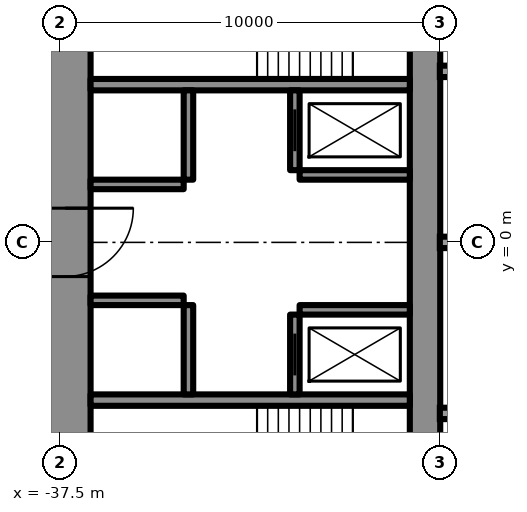
"""IFC4 building model, lengths in metres.
Left out: names, types, materials, properties, quantities, classifications, styles, units other than length and angle.
Written with IfcOpenShell. Run it as: python <this file> out.ifc"""

import sys

from ifc_helpers import new_model, si_unit, direction, frame, frame_2d, origin, place, context, subcontext, project, spatial, rectangle, extrude, element, fill, save


model = new_model("IFC4")
c1 = context("Model", 3, precision=1e-05, world=origin(), true_north=direction((0.0, 1.0)))
c2 = subcontext(c1, "Body", "Model", "MODEL_VIEW")
j1 = project(units=[si_unit("LENGTHUNIT", "METRE"), si_unit("PLANEANGLEUNIT", "RADIAN")], contexts=[c1])
p1 = place(None, origin())
s1 = spatial("IfcSite", under=j1, at=p1, CompositionType="ELEMENT")
p2 = place(p1, origin())
s2 = spatial("IfcBuilding", under=s1, at=p2, CompositionType="ELEMENT")
p3 = place(p2, frame((0.0, 0.0, 87.0)))
s3 = spatial("IfcBuildingStorey", under=s2, at=p3, CompositionType="ELEMENT", Elevation=87.0)
p4 = place(p3, frame((-27.9, 8.6, 0.0), z_axis=(0.0, 0.0, 1.0), x_axis=(0.0, -1.0, 0.0)))
e1 = element("IfcWall", 1, at=p4, inside=s3, PredefinedType="SHEAR", context=c2, shape_type="SweptSolid", body=[
    extrude(rectangle(XDim=17.2, YDim=0.8, at=frame_2d((8.6, 0.0))), origin(), (0.0, 0.0, 1.0), 3.6),
])
p5 = place(p4, frame((2.45, 0.0, 0.6)))
e2 = element("IfcOpeningElement", 2, at=p5, cuts=e1, PredefinedType="OPENING", context=c2, shape_type="SweptSolid", body=[
    extrude(rectangle(XDim=0.6, YDim=2.1, at=frame_2d((0.3, 1.05))), frame((0.0, 0.41, 0.0), z_axis=(0.0, -1.0, 0.0), x_axis=(1.0, 0.0, 0.0)), (0.0, 0.0, 1.0), 0.82),
])
p6 = place(p4, frame((14.15, 0.0, 0.6)))
e3 = element("IfcOpeningElement", 3, at=p6, cuts=e1, PredefinedType="OPENING", context=c2, shape_type="SweptSolid", body=[
    extrude(rectangle(XDim=0.6, YDim=2.1, at=frame_2d((0.3, 1.05))), frame((0.0, 0.41, 0.0), z_axis=(0.0, -1.0, 0.0), x_axis=(1.0, 0.0, 0.0)), (0.0, 0.0, 1.0), 0.82),
])
p7 = place(p3, frame((-37.375, 8.6, 0.0), z_axis=(0.0, 0.0, 1.0), x_axis=(0.0, -1.0, 0.0)))
e4 = element("IfcWall", 4, at=p7, inside=s3, PredefinedType="SHEAR", context=c2, shape_type="SweptSolid", body=[
    extrude(rectangle(XDim=17.2, YDim=1.35, at=frame_2d((8.6, 0.0))), origin(), (0.0, 0.0, 1.0), 3.6),
])
p8 = place(p7, frame((7.7, 0.0, 0.0)))
e5 = element("IfcOpeningElement", 5, at=p8, cuts=e4, PredefinedType="OPENING", context=c2, shape_type="SweptSolid", body=[
    extrude(rectangle(XDim=1.8, YDim=2.2, at=frame_2d((0.9, 1.1))), frame((0.0, 0.685, 0.0), z_axis=(0.0, -1.0, 0.0), x_axis=(1.0, 0.0, 0.0)), (0.0, 0.0, 1.0), 1.37),
])
for number, where, z_axis, x_axis in (
    (6, (-28.3, 4.15, 0.0), (0.0, 0.0, 1.0), (-1.0, 0.0, 0.0)),
    (7, (-28.3, -4.15, 0.0), (0.0, 0.0, 1.0), (-1.0, 0.0, 0.0)),
):
    element("IfcWall", number, at=place(p3, frame(where, z_axis=z_axis, x_axis=x_axis)), inside=s3, PredefinedType="SHEAR", context=c2, shape_type="SweptSolid", body=[
        extrude(rectangle(XDim=8.4, YDim=0.3, at=frame_2d((4.2, 0.0))), origin(), (0.0, 0.0, 1.0), 3.6),
    ])
p9 = place(p3, frame((-31.325, 4.0, 0.0), z_axis=(0.0, 0.0, 1.0), x_axis=(0.0, -1.0, 0.0)))
e8 = element("IfcWall", 8, at=p9, inside=s3, PredefinedType="SHEAR", context=c2, shape_type="SweptSolid", body=[
    extrude(rectangle(XDim=2.1, YDim=0.25, at=frame_2d((1.05, 0.0))), origin(), (0.0, 0.0, 1.0), 3.6),
])
p10 = place(p9, frame((0.5, 0.0, 0.0)))
e9 = element("IfcOpeningElement", 9, at=p10, cuts=e8, PredefinedType="OPENING", context=c2, shape_type="SweptSolid", body=[
    extrude(rectangle(XDim=1.1, YDim=2.2, at=frame_2d((0.55, 1.1))), frame((0.0, 0.135, 0.0), z_axis=(0.0, -1.0, 0.0), x_axis=(1.0, 0.0, 0.0)), (0.0, 0.0, 1.0), 0.27),
])
p11 = place(p3, frame((-34.125, 4.0, 0.0), z_axis=(0.0, 0.0, 1.0), x_axis=(0.0, -1.0, 0.0)))
e10 = element("IfcWall", 10, at=p11, inside=s3, PredefinedType="SHEAR", context=c2, shape_type="SweptSolid", body=[
    extrude(rectangle(XDim=2.35, YDim=0.25, at=frame_2d((1.175, 0.0))), origin(), (0.0, 0.0, 1.0), 3.6),
])
p12 = place(p3, frame((-28.3, 1.775, 0.0), z_axis=(0.0, 0.0, 1.0), x_axis=(-1.0, 0.0, 0.0)))
e11 = element("IfcWall", 11, at=p12, inside=s3, PredefinedType="SHEAR", context=c2, shape_type="SweptSolid", body=[
    extrude(rectangle(XDim=2.9, YDim=0.25, at=frame_2d((1.45, 0.0))), origin(), (0.0, 0.0, 1.0), 3.6),
])
p13 = place(p3, frame((-34.25, 1.525, 0.0), z_axis=(0.0, 0.0, 1.0), x_axis=(-1.0, 0.0, 0.0)))
e12 = element("IfcWall", 12, at=p13, inside=s3, PredefinedType="SHEAR", context=c2, shape_type="SweptSolid", body=[
    extrude(rectangle(XDim=2.45, YDim=0.25, at=frame_2d((1.225, 0.0))), origin(), (0.0, 0.0, 1.0), 3.6),
])
p14 = place(p3, frame((-31.325, -1.9, 0.0), z_axis=(0.0, 0.0, 1.0), x_axis=(0.0, -1.0, 0.0)))
e13 = element("IfcWall", 13, at=p14, inside=s3, PredefinedType="SHEAR", context=c2, shape_type="SweptSolid", body=[
    extrude(rectangle(XDim=2.1, YDim=0.25, at=frame_2d((1.05, 0.0))), origin(), (0.0, 0.0, 1.0), 3.6),
])
p15 = place(p14, frame((0.5, 0.0, 0.0)))
e14 = element("IfcOpeningElement", 14, at=p15, cuts=e13, PredefinedType="OPENING", context=c2, shape_type="SweptSolid", body=[
    extrude(rectangle(XDim=1.1, YDim=2.2, at=frame_2d((0.55, 1.1))), frame((0.0, 0.135, 0.0), z_axis=(0.0, -1.0, 0.0), x_axis=(1.0, 0.0, 0.0)), (0.0, 0.0, 1.0), 0.27),
])
p16 = place(p3, frame((-34.125, -1.65, 0.0), z_axis=(0.0, 0.0, 1.0), x_axis=(0.0, -1.0, 0.0)))
e15 = element("IfcWall", 15, at=p16, inside=s3, PredefinedType="SHEAR", context=c2, shape_type="SweptSolid", body=[
    extrude(rectangle(XDim=2.35, YDim=0.25, at=frame_2d((1.175, 0.0))), origin(), (0.0, 0.0, 1.0), 3.6),
])
p17 = place(p3, frame((-28.3, -1.775, 0.0), z_axis=(0.0, 0.0, 1.0), x_axis=(-1.0, 0.0, 0.0)))
e16 = element("IfcWall", 16, at=p17, inside=s3, PredefinedType="SHEAR", context=c2, shape_type="SweptSolid", body=[
    extrude(rectangle(XDim=2.9, YDim=0.25, at=frame_2d((1.45, 0.0))), origin(), (0.0, 0.0, 1.0), 3.6),
])
p18 = place(p3, frame((-34.25, -1.525, 0.0), z_axis=(0.0, 0.0, 1.0), x_axis=(-1.0, 0.0, 0.0)))
e17 = element("IfcWall", 17, at=p18, inside=s3, PredefinedType="SHEAR", context=c2, shape_type="SweptSolid", body=[
    extrude(rectangle(XDim=2.45, YDim=0.25, at=frame_2d((1.225, 0.0))), origin(), (0.0, 0.0, 1.0), 3.6),
])
p19 = place(p3, frame((-27.2, 14.3, 0.0), z_axis=(0.0, 0.0, 1.0), x_axis=(-0.866026593062, -0.499997940104, 0.0)))
e18 = element("IfcWall", 18, at=p19, inside=s3, PredefinedType="SHEAR", context=c2, shape_type="SweptSolid", body=[
    extrude(rectangle(XDim=28.946, YDim=1.2, at=frame_2d((14.473, 0.0))), origin(), (0.0, 0.0, 1.0), 3.6),
])
p20 = place(p19, frame((4.6, 0.0, 0.0)))
e19 = element("IfcOpeningElement", 19, at=p20, cuts=e18, PredefinedType="OPENING", context=c2, shape_type="SweptSolid", body=[
    extrude(rectangle(XDim=1.0, YDim=2.2, at=frame_2d((0.5, 1.1))), frame((0.0, 0.61, 0.0), z_axis=(0.0, -1.0, 0.0), x_axis=(1.0, 0.0, 0.0)), (0.0, 0.0, 1.0), 1.22),
])
p21 = place(p19, frame((13.568, 0.0, 0.0)))
e20 = element("IfcOpeningElement", 20, at=p21, cuts=e18, PredefinedType="OPENING", context=c2, shape_type="SweptSolid", body=[
    extrude(rectangle(XDim=1.8, YDim=2.03, at=frame_2d((0.9, 1.015))), frame((0.0, 0.61, 0.0), z_axis=(0.0, -1.0, 0.0), x_axis=(1.0, 0.0, 0.0)), (0.0, 0.0, 1.0), 1.22),
])
p22 = place(p3, frame((-27.2, -14.3, 0.0), z_axis=(0.0, 0.0, 1.0), x_axis=(-0.866024021859, 0.500002393557, 0.0)))
e21 = element("IfcWall", 21, at=p22, inside=s3, PredefinedType="SHEAR", context=c2, shape_type="SweptSolid", body=[
    extrude(rectangle(XDim=27.907, YDim=1.2, at=frame_2d((13.954, 0.0))), origin(), (0.0, 0.0, 1.0), 3.6),
])
p23 = place(p22, frame((4.6, 0.0, 0.0)))
e22 = element("IfcOpeningElement", 22, at=p23, cuts=e21, PredefinedType="OPENING", context=c2, shape_type="SweptSolid", body=[
    extrude(rectangle(XDim=1.0, YDim=2.2, at=frame_2d((0.5, 1.1))), frame((0.0, 0.61, 0.0), z_axis=(0.0, -1.0, 0.0), x_axis=(1.0, 0.0, 0.0)), (0.0, 0.0, 1.0), 1.22),
])
p24 = place(p22, frame((13.818, 0.0, 0.0)))
e23 = element("IfcOpeningElement", 23, at=p24, cuts=e21, PredefinedType="OPENING", context=c2, shape_type="SweptSolid", body=[
    extrude(rectangle(XDim=1.8, YDim=2.2, at=frame_2d((0.9, 1.1))), frame((0.0, 0.61, 0.0), z_axis=(0.0, -1.0, 0.0), x_axis=(1.0, 0.0, 0.0)), (0.0, 0.0, 1.0), 1.22),
])
p25 = place(p3, frame((-37.7, 10.894, 0.0), z_axis=(0.0, 0.0, 1.0), x_axis=(-0.866027905338, -0.499995667157, 0.0)))
e24 = element("IfcWall", 24, at=p25, inside=s3, PredefinedType="PARTITIONING", context=c2, shape_type="SweptSolid", body=[
    extrude(rectangle(XDim=21.787, YDim=0.2, at=frame_2d((10.894, 0.0))), origin(), (0.0, 0.0, 1.0), 3.35),
])
p26 = place(p25, frame((15.094, 0.0, 0.0)))
e25 = element("IfcOpeningElement", 25, at=p26, cuts=e24, PredefinedType="OPENING", context=c2, shape_type="SweptSolid", body=[
    extrude(rectangle(XDim=1.8, YDim=2.2, at=frame_2d((0.9, 1.1))), frame((0.0, 0.11, 0.0), z_axis=(0.0, -1.0, 0.0), x_axis=(1.0, 0.0, 0.0)), (0.0, 0.0, 1.0), 0.22),
])
p27 = place(p25, frame((4.201, 0.0, 0.0)))
e26 = element("IfcOpeningElement", 26, at=p27, cuts=e24, PredefinedType="OPENING", context=c2, shape_type="SweptSolid", body=[
    extrude(rectangle(XDim=1.8, YDim=2.2, at=frame_2d((0.9, 1.1))), frame((0.0, 0.11, 0.0), z_axis=(0.0, -1.0, 0.0), x_axis=(1.0, 0.0, 0.0)), (0.0, 0.0, 1.0), 0.22),
])
p28 = place(p3, frame((-36.92, -11.344, 0.0), z_axis=(0.0, 0.0, 1.0), x_axis=(-0.866028313256, 0.499994960614, 0.0)))
e27 = element("IfcWall", 27, at=p28, inside=s3, PredefinedType="PARTITIONING", context=c2, shape_type="SweptSolid", body=[
    extrude(rectangle(XDim=22.568, YDim=0.2, at=frame_2d((11.284, 0.0))), origin(), (0.0, 0.0, 1.0), 3.35),
])
p29 = place(p28, frame((15.994, 0.0, 0.0)))
e28 = element("IfcOpeningElement", 28, at=p29, cuts=e27, PredefinedType="OPENING", context=c2, shape_type="SweptSolid", body=[
    extrude(rectangle(XDim=1.8, YDim=2.2, at=frame_2d((0.9, 1.1))), frame((0.0, 0.11, 0.0), z_axis=(0.0, -1.0, 0.0), x_axis=(1.0, 0.0, 0.0)), (0.0, 0.0, 1.0), 0.22),
])
p30 = place(p28, frame((4.551, 0.0, 0.0)))
e29 = element("IfcOpeningElement", 29, at=p30, cuts=e27, PredefinedType="OPENING", context=c2, shape_type="SweptSolid", body=[
    extrude(rectangle(XDim=2.0, YDim=2.4, at=frame_2d((1.0, 1.2))), frame((0.0, 0.11, 0.0), z_axis=(0.0, -1.0, 0.0), x_axis=(1.0, 0.0, 0.0)), (0.0, 0.0, 1.0), 0.22),
])
p31 = place(p8, origin())
e30 = element("IfcDoor", 30, at=p31, inside=s3, OperationType="DOUBLE_DOOR_SINGLE_SWING", PredefinedType="DOOR", context=c2, shape_type="SweptSolid", body=[
    extrude(rectangle(XDim=1.8, YDim=2.2, at=frame_2d((0.9, 1.1))), frame((0.0, 0.025, 0.0), z_axis=(0.0, -1.0, 0.0), x_axis=(1.0, 0.0, 0.0)), (0.0, 0.0, 1.0), 0.05),
])
fill(e5, e30)
p32 = place(p10, origin())
e31 = element("IfcDoor", 31, at=p32, inside=s3, OperationType="SLIDING_TO_LEFT", PredefinedType="USERDEFINED", context=c2, shape_type="SweptSolid", body=[
    extrude(rectangle(XDim=1.1, YDim=2.2, at=frame_2d((0.55, 1.1))), frame((0.0, 0.025, 0.0), z_axis=(0.0, -1.0, 0.0), x_axis=(1.0, 0.0, 0.0)), (0.0, 0.0, 1.0), 0.05),
])
fill(e9, e31)
p33 = place(p15, origin())
e32 = element("IfcDoor", 32, at=p33, inside=s3, OperationType="SLIDING_TO_LEFT", PredefinedType="USERDEFINED", context=c2, shape_type="SweptSolid", body=[
    extrude(rectangle(XDim=1.1, YDim=2.2, at=frame_2d((0.55, 1.1))), frame((0.0, 0.025, 0.0), z_axis=(0.0, -1.0, 0.0), x_axis=(1.0, 0.0, 0.0)), (0.0, 0.0, 1.0), 0.05),
])
fill(e14, e32)
save(model, sys.argv[1])
